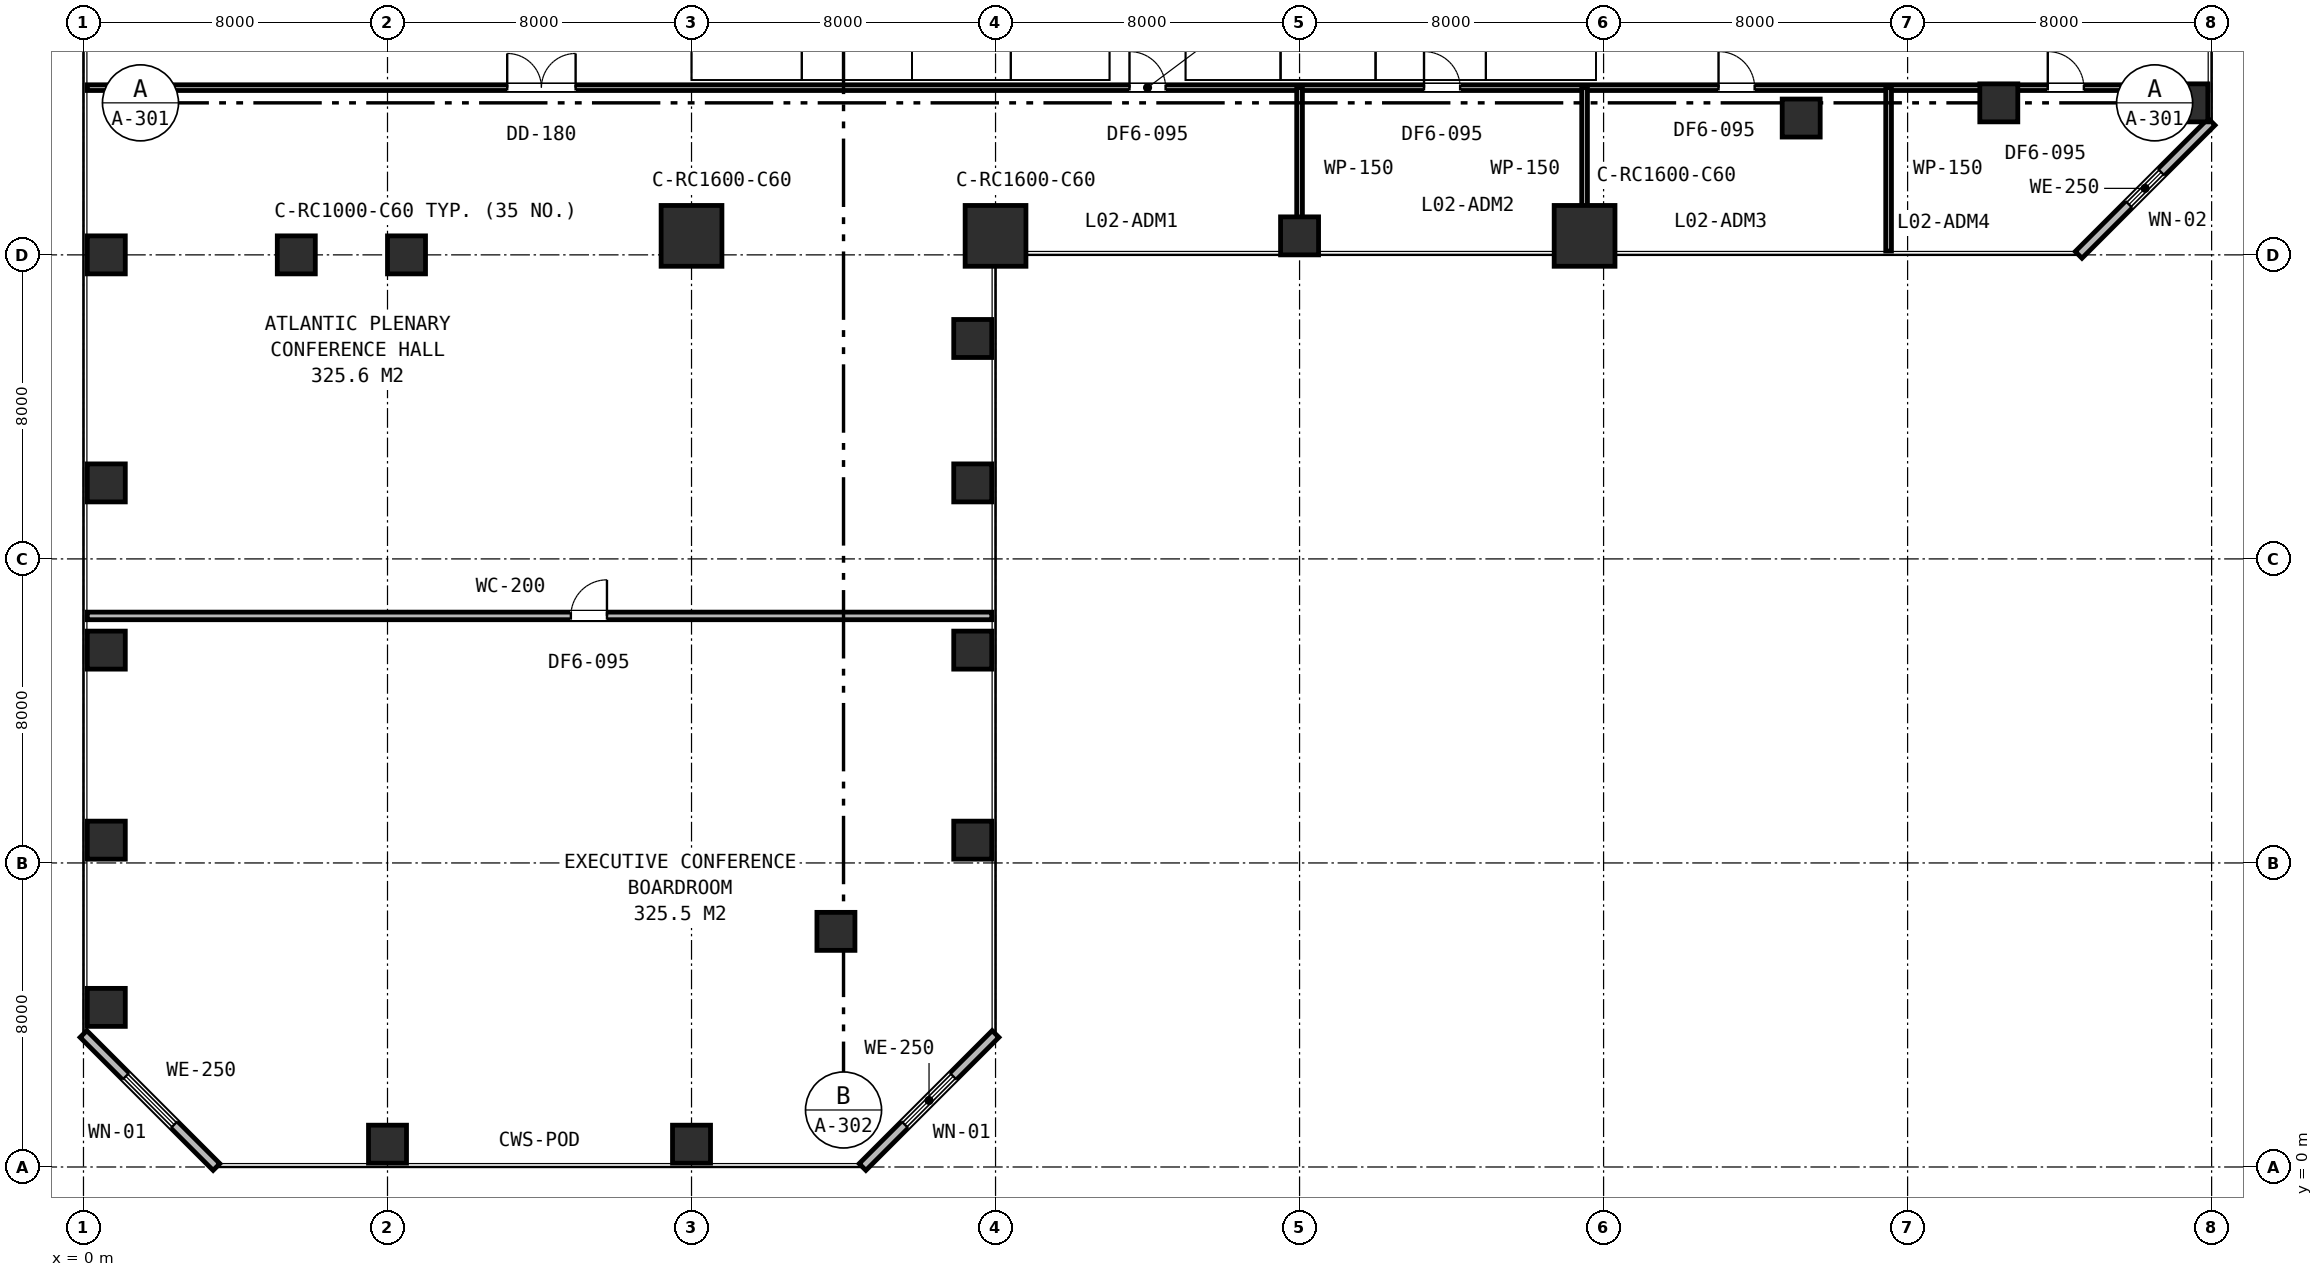
"""IFC4 building model, lengths in metres.
Left out: names, types, materials, properties, quantities, classifications, styles, units other than length and angle.
Written with IfcOpenShell. Run it as: python <this file> out.ifc"""

import sys

from ifc_helpers import new_model, si_unit, direction, frame, frame_2d, origin, origin_2d, place, context, subcontext, project, spatial, rectangle, extrude, element, fill, save


model = new_model("IFC4")
c1 = context("Model", 3, precision=1e-05, world=origin(), true_north=direction((0.0, 1.0)))
c2 = subcontext(c1, "Body", "Model", "MODEL_VIEW")
j1 = project(units=[si_unit("LENGTHUNIT", "METRE"), si_unit("PLANEANGLEUNIT", "RADIAN")], contexts=[c1])
p1 = place(None, origin())
s1 = spatial("IfcSite", under=j1, at=p1, CompositionType="ELEMENT")
p2 = place(p1, origin())
s2 = spatial("IfcBuilding", under=s1, at=p2, CompositionType="ELEMENT")
p3 = place(p2, frame((0.0, 0.0, 11.1)))
s3 = spatial("IfcBuildingStorey", under=s2, at=p3, CompositionType="ELEMENT", Elevation=11.1)
p4 = place(p3, frame((8.5, 24.0, 0.0), z_axis=(0.0, 0.0, 1.0), x_axis=(1.0, 0.0, 0.0)))
e1 = element("IfcColumn", 1, at=p4, inside=s3, PredefinedType="COLUMN", context=c2, shape_type="SweptSolid", body=[
    extrude(rectangle(XDim=1.0, YDim=1.0, at=origin_2d()), origin(), (0.0, 0.0, 1.0), 4.8),
])
for number, where, z_axis, x_axis in (
    (2, (16.0, 24.5, 0.0), (0.0, 0.0, 1.0), (1.0, 0.0, 0.0)),
    (3, (24.0, 24.5, 0.0), (0.0, 0.0, 1.0), (1.0, 0.0, 0.0)),
):
    element("IfcColumn", number, at=place(p3, frame(where, z_axis=z_axis, x_axis=x_axis)), inside=s3, PredefinedType="COLUMN", context=c2, shape_type="SweptSolid", body=[
        extrude(rectangle(XDim=1.6, YDim=1.6, at=origin_2d()), origin(), (0.0, 0.0, 1.0), 4.8),
    ])
p5 = place(p3, frame((32.0, 24.5, 0.0), z_axis=(0.0, 0.0, 1.0), x_axis=(1.0, 0.0, 0.0)))
e4 = element("IfcColumn", 4, at=p5, inside=s3, PredefinedType="COLUMN", context=c2, shape_type="SweptSolid", body=[
    extrude(rectangle(XDim=1.0, YDim=1.0, at=origin_2d()), origin(), (0.0, 0.0, 1.0), 4.8),
])
p6 = place(p3, frame((39.5, 24.5, 0.0), z_axis=(0.0, 0.0, 1.0), x_axis=(1.0, 0.0, 0.0)))
e5 = element("IfcColumn", 5, at=p6, inside=s3, PredefinedType="COLUMN", context=c2, shape_type="SweptSolid", body=[
    extrude(rectangle(XDim=1.6, YDim=1.6, at=origin_2d()), origin(), (0.0, 0.0, 1.0), 4.8),
])
for number, where, z_axis, x_axis in (
    (6, (5.6, 24.0, 0.0), (0.0, 0.0, 1.0), (1.0, 0.0, 0.0)),
    (7, (45.2, 27.6, 0.0), (0.0, 0.0, 1.0), (1.0, 0.0, 0.0)),
    (8, (0.6, 24.0, 0.0), (0.0, 0.0, 1.0), (1.0, 0.0, 0.0)),
    (9, (50.4, 28.0, 0.0), (0.0, 0.0, 1.0), (1.0, 0.0, 0.0)),
    (10, (55.4, 28.0, 0.0), (0.0, 0.0, 1.0), (1.0, 0.0, 0.0)),
    (11, (0.6, 8.6, 0.0), (0.0, 0.0, 1.0), (1.0, 0.0, 0.0)),
    (12, (0.6, 13.6, 0.0), (0.0, 0.0, 1.0), (1.0, 0.0, 0.0)),
    (13, (0.6, 18.0, 0.0), (0.0, 0.0, 1.0), (1.0, 0.0, 0.0)),
    (14, (0.6, 4.2, 0.0), (0.0, 0.0, 1.0), (1.0, 0.0, 0.0)),
    (15, (8.0, 0.6, 0.0), (0.0, 0.0, 1.0), (1.0, 0.0, 0.0)),
    (16, (16.0, 0.6, 0.0), (0.0, 0.0, 1.0), (1.0, 0.0, 0.0)),
    (17, (19.8, 6.2, 0.0), (0.0, 0.0, 1.0), (1.0, 0.0, 0.0)),
    (18, (23.4, 8.6, 0.0), (0.0, 0.0, 1.0), (1.0, 0.0, 0.0)),
    (19, (23.4, 13.6, 0.0), (0.0, 0.0, 1.0), (1.0, 0.0, 0.0)),
    (20, (23.4, 18.0, 0.0), (0.0, 0.0, 1.0), (1.0, 0.0, 0.0)),
    (21, (23.4, 21.8, 0.0), (0.0, 0.0, 1.0), (1.0, 0.0, 0.0)),
):
    element("IfcColumn", number, at=place(p3, frame(where, z_axis=z_axis, x_axis=x_axis)), inside=s3, PredefinedType="COLUMN", context=c2, shape_type="SweptSolid", body=[
        extrude(rectangle(XDim=1.0, YDim=1.0, at=origin_2d()), origin(), (0.0, 0.0, 1.0), 4.8),
    ])
p7 = place(p3, frame((20.5, 0.0, 0.0), z_axis=(0.0, 0.0, 1.0), x_axis=(0.707106781187, 0.707106781187, 0.0)))
e22 = element("IfcWall", 22, at=p7, inside=s3, PredefinedType="STANDARD", context=c2, shape_type="SweptSolid", body=[
    extrude(rectangle(XDim=4.95, YDim=0.25, at=frame_2d((2.475, 0.0))), origin(), (0.0, 0.0, 1.0), 4.47),
])
p8 = place(p7, frame((1.575, 0.0, 0.75)))
e23 = element("IfcOpeningElement", 23, at=p8, cuts=e22, PredefinedType="OPENING", context=c2, shape_type="SweptSolid", body=[
    extrude(rectangle(XDim=1.8, YDim=1.85, at=frame_2d((0.9, 0.925))), frame((0.0, 0.135, 0.0), z_axis=(0.0, -1.0, 0.0), x_axis=(1.0, 0.0, 0.0)), (0.0, 0.0, 1.0), 0.27),
])
p9 = place(p3, frame((52.5, 24.0, 0.0), z_axis=(0.0, 0.0, 1.0), x_axis=(0.707106781187, 0.707106781187, 0.0)))
e24 = element("IfcWall", 24, at=p9, inside=s3, PredefinedType="STANDARD", context=c2, shape_type="SweptSolid", body=[
    extrude(rectangle(XDim=4.95, YDim=0.25, at=frame_2d((2.475, 0.0))), origin(), (0.0, 0.0, 1.0), 4.47),
])
p10 = place(p9, frame((1.875, 0.0, 0.85)))
e25 = element("IfcOpeningElement", 25, at=p10, cuts=e24, PredefinedType="OPENING", context=c2, shape_type="SweptSolid", body=[
    extrude(rectangle(XDim=1.2, YDim=1.6, at=frame_2d((0.6, 0.8))), frame((0.0, 0.135, 0.0), z_axis=(0.0, -1.0, 0.0), x_axis=(1.0, 0.0, 0.0)), (0.0, 0.0, 1.0), 0.27),
])
p11 = place(p3, frame((0.0, 3.5, 0.0), z_axis=(0.0, 0.0, 1.0), x_axis=(0.707106781187, -0.707106781187, 0.0)))
e26 = element("IfcWall", 26, at=p11, inside=s3, PredefinedType="STANDARD", context=c2, shape_type="SweptSolid", body=[
    extrude(rectangle(XDim=4.95, YDim=0.25, at=frame_2d((2.475, 0.0))), origin(), (0.0, 0.0, 1.0), 4.47),
])
p12 = place(p11, frame((1.575, 0.0, 0.75)))
e27 = element("IfcOpeningElement", 27, at=p12, cuts=e26, PredefinedType="OPENING", context=c2, shape_type="SweptSolid", body=[
    extrude(rectangle(XDim=1.8, YDim=1.85, at=frame_2d((0.9, 0.925))), frame((0.0, 0.135, 0.0), z_axis=(0.0, -1.0, 0.0), x_axis=(1.0, 0.0, 0.0)), (0.0, 0.0, 1.0), 0.27),
])
p13 = place(p3, frame((0.1, 28.4, 0.0), z_axis=(0.0, 0.0, 1.0), x_axis=(1.0, 0.0, 0.0)))
e28 = element("IfcWall", 28, at=p13, inside=s3, PredefinedType="PARTITIONING", context=c2, shape_type="SweptSolid", body=[
    extrude(rectangle(XDim=55.8, YDim=0.15, at=frame_2d((27.9, 0.0))), origin(), (0.0, 0.0, 1.0), 3.82),
])
p14 = place(p13, frame((27.425, 0.0, 0.0)))
e29 = element("IfcOpeningElement", 29, at=p14, cuts=e28, PredefinedType="OPENING", context=c2, shape_type="SweptSolid", body=[
    extrude(rectangle(XDim=0.95, YDim=2.15, at=frame_2d((0.475, 1.075))), frame((0.0, 0.085, 0.0), z_axis=(0.0, -1.0, 0.0), x_axis=(1.0, 0.0, 0.0)), (0.0, 0.0, 1.0), 0.17),
])
p15 = place(p13, frame((35.175, 0.0, 0.0)))
e30 = element("IfcOpeningElement", 30, at=p15, cuts=e28, PredefinedType="OPENING", context=c2, shape_type="SweptSolid", body=[
    extrude(rectangle(XDim=0.95, YDim=2.15, at=frame_2d((0.475, 1.075))), frame((0.0, 0.085, 0.0), z_axis=(0.0, -1.0, 0.0), x_axis=(1.0, 0.0, 0.0)), (0.0, 0.0, 1.0), 0.17),
])
p16 = place(p13, frame((42.925, 0.0, 0.0)))
e31 = element("IfcOpeningElement", 31, at=p16, cuts=e28, PredefinedType="OPENING", context=c2, shape_type="SweptSolid", body=[
    extrude(rectangle(XDim=0.95, YDim=2.15, at=frame_2d((0.475, 1.075))), frame((0.0, 0.085, 0.0), z_axis=(0.0, -1.0, 0.0), x_axis=(1.0, 0.0, 0.0)), (0.0, 0.0, 1.0), 0.17),
])
p17 = place(p13, frame((51.589, 0.0, 0.0)))
e32 = element("IfcOpeningElement", 32, at=p17, cuts=e28, PredefinedType="OPENING", context=c2, shape_type="SweptSolid", body=[
    extrude(rectangle(XDim=0.95, YDim=2.15, at=frame_2d((0.475, 1.075))), frame((0.0, 0.085, 0.0), z_axis=(0.0, -1.0, 0.0), x_axis=(1.0, 0.0, 0.0)), (0.0, 0.0, 1.0), 0.17),
])
p18 = place(p13, frame((11.05, 0.0, 0.0)))
e33 = element("IfcOpeningElement", 33, at=p18, cuts=e28, PredefinedType="OPENING", context=c2, shape_type="SweptSolid", body=[
    extrude(rectangle(XDim=1.8, YDim=2.15, at=frame_2d((0.9, 1.075))), frame((0.0, 0.085, 0.0), z_axis=(0.0, -1.0, 0.0), x_axis=(1.0, 0.0, 0.0)), (0.0, 0.0, 1.0), 0.17),
])
p19 = place(p3, frame((32.0, 24.1, 0.0), z_axis=(0.0, 0.0, 1.0), x_axis=(0.0, 1.0, 0.0)))
e34 = element("IfcWall", 34, at=p19, inside=s3, PredefinedType="PARTITIONING", context=c2, shape_type="SweptSolid", body=[
    extrude(rectangle(XDim=4.3, YDim=0.15, at=frame_2d((2.15, 0.0))), origin(), (0.0, 0.0, 1.0), 4.01),
])
p20 = place(p3, frame((39.5, 24.1, 0.0), z_axis=(0.0, 0.0, 1.0), x_axis=(0.0, 1.0, 0.0)))
e35 = element("IfcWall", 35, at=p20, inside=s3, PredefinedType="PARTITIONING", context=c2, shape_type="SweptSolid", body=[
    extrude(rectangle(XDim=4.3, YDim=0.15, at=frame_2d((2.15, 0.0))), origin(), (0.0, 0.0, 1.0), 3.82),
])
p21 = place(p3, frame((47.5, 24.1, 0.0), z_axis=(0.0, 0.0, 1.0), x_axis=(0.0, 1.0, 0.0)))
e36 = element("IfcWall", 36, at=p21, inside=s3, PredefinedType="PARTITIONING", context=c2, shape_type="SweptSolid", body=[
    extrude(rectangle(XDim=4.3, YDim=0.15, at=frame_2d((2.15, 0.0))), origin(), (0.0, 0.0, 1.0), 4.47),
])
p22 = place(p3, frame((0.1, 14.5, 0.0), z_axis=(0.0, 0.0, 1.0), x_axis=(1.0, 0.0, 0.0)))
e37 = element("IfcWall", 37, at=p22, inside=s3, PredefinedType="PARTITIONING", context=c2, shape_type="SweptSolid", body=[
    extrude(rectangle(XDim=23.8, YDim=0.2, at=frame_2d((11.9, 0.0))), origin(), (0.0, 0.0, 1.0), 4.22),
])
p23 = place(p22, frame((12.725, 0.0, 0.0)))
e38 = element("IfcOpeningElement", 38, at=p23, cuts=e37, PredefinedType="OPENING", context=c2, shape_type="SweptSolid", body=[
    extrude(rectangle(XDim=0.95, YDim=2.15, at=frame_2d((0.475, 1.075))), frame((0.0, 0.11, 0.0), z_axis=(0.0, -1.0, 0.0), x_axis=(1.0, 0.0, 0.0)), (0.0, 0.0, 1.0), 0.22),
])
p24 = place(p8, origin())
e39 = element("IfcWindow", 39, at=p24, inside=s3, PartitioningType="SINGLE_PANEL", PredefinedType="WINDOW", context=c2, shape_type="SweptSolid", body=[
    extrude(rectangle(XDim=1.8, YDim=1.85, at=frame_2d((0.9, 0.925))), frame((0.0, 0.03, 0.0), z_axis=(0.0, -1.0, 0.0), x_axis=(1.0, 0.0, 0.0)), (0.0, 0.0, 1.0), 0.06),
])
fill(e23, e39)
p25 = place(p10, origin())
e40 = element("IfcWindow", 40, at=p25, inside=s3, PartitioningType="SINGLE_PANEL", PredefinedType="WINDOW", context=c2, shape_type="SweptSolid", body=[
    extrude(rectangle(XDim=1.2, YDim=1.6, at=frame_2d((0.6, 0.8))), frame((0.0, 0.03, 0.0), z_axis=(0.0, -1.0, 0.0), x_axis=(1.0, 0.0, 0.0)), (0.0, 0.0, 1.0), 0.06),
])
fill(e25, e40)
p26 = place(p12, origin())
e41 = element("IfcWindow", 41, at=p26, inside=s3, PartitioningType="SINGLE_PANEL", PredefinedType="WINDOW", context=c2, shape_type="SweptSolid", body=[
    extrude(rectangle(XDim=1.8, YDim=1.85, at=frame_2d((0.9, 0.925))), frame((0.0, 0.03, 0.0), z_axis=(0.0, -1.0, 0.0), x_axis=(1.0, 0.0, 0.0)), (0.0, 0.0, 1.0), 0.06),
])
fill(e27, e41)
p27 = place(p14, origin())
e42 = element("IfcDoor", 42, at=p27, inside=s3, OperationType="SINGLE_SWING_LEFT", PredefinedType="DOOR", context=c2, shape_type="SweptSolid", body=[
    extrude(rectangle(XDim=0.95, YDim=2.15, at=frame_2d((0.475, 1.075))), frame((0.0, 0.025, 0.0), z_axis=(0.0, -1.0, 0.0), x_axis=(1.0, 0.0, 0.0)), (0.0, 0.0, 1.0), 0.05),
])
fill(e29, e42)
p28 = place(p15, origin())
e43 = element("IfcDoor", 43, at=p28, inside=s3, OperationType="SINGLE_SWING_LEFT", PredefinedType="DOOR", context=c2, shape_type="SweptSolid", body=[
    extrude(rectangle(XDim=0.95, YDim=2.15, at=frame_2d((0.475, 1.075))), frame((0.0, 0.025, 0.0), z_axis=(0.0, -1.0, 0.0), x_axis=(1.0, 0.0, 0.0)), (0.0, 0.0, 1.0), 0.05),
])
fill(e30, e43)
p29 = place(p16, origin())
e44 = element("IfcDoor", 44, at=p29, inside=s3, OperationType="SINGLE_SWING_LEFT", PredefinedType="DOOR", context=c2, shape_type="SweptSolid", body=[
    extrude(rectangle(XDim=0.95, YDim=2.15, at=frame_2d((0.475, 1.075))), frame((0.0, 0.025, 0.0), z_axis=(0.0, -1.0, 0.0), x_axis=(1.0, 0.0, 0.0)), (0.0, 0.0, 1.0), 0.05),
])
fill(e31, e44)
p30 = place(p17, origin())
e45 = element("IfcDoor", 45, at=p30, inside=s3, OperationType="SINGLE_SWING_LEFT", PredefinedType="DOOR", context=c2, shape_type="SweptSolid", body=[
    extrude(rectangle(XDim=0.95, YDim=2.15, at=frame_2d((0.475, 1.075))), frame((0.0, 0.025, 0.0), z_axis=(0.0, -1.0, 0.0), x_axis=(1.0, 0.0, 0.0)), (0.0, 0.0, 1.0), 0.05),
])
fill(e32, e45)
p31 = place(p18, origin())
e46 = element("IfcDoor", 46, at=p31, inside=s3, OperationType="DOUBLE_DOOR_SINGLE_SWING", PredefinedType="DOOR", context=c2, shape_type="SweptSolid", body=[
    extrude(rectangle(XDim=1.8, YDim=2.15, at=frame_2d((0.9, 1.075))), frame((0.0, 0.025, 0.0), z_axis=(0.0, -1.0, 0.0), x_axis=(1.0, 0.0, 0.0)), (0.0, 0.0, 1.0), 0.05),
])
fill(e33, e46)
p32 = place(p23, origin())
e47 = element("IfcDoor", 47, at=p32, inside=s3, OperationType="SINGLE_SWING_RIGHT", PredefinedType="DOOR", context=c2, shape_type="SweptSolid", body=[
    extrude(rectangle(XDim=0.95, YDim=2.15, at=frame_2d((0.475, 1.075))), frame((0.0, 0.025, 0.0), z_axis=(0.0, -1.0, 0.0), x_axis=(1.0, 0.0, 0.0)), (0.0, 0.0, 1.0), 0.05),
])
fill(e38, e47)
save(model, sys.argv[1])
